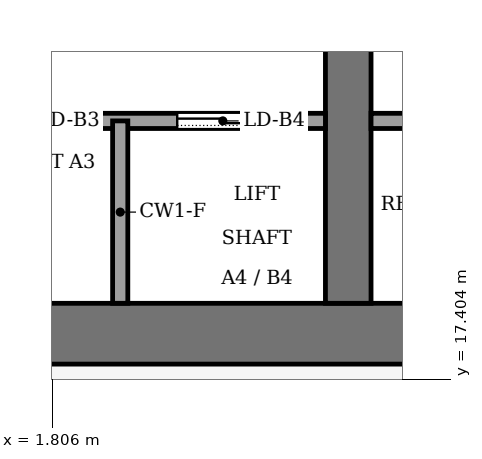
"""IFC4 building model, lengths in metres.
Left out: names, types, materials, properties, quantities, classifications, styles, units other than length and angle.
Written with IfcOpenShell. Run it as: python <this file> out.ifc"""

import sys

from ifc_helpers import new_model, si_unit, direction, frame, frame_2d, origin, place, context, subcontext, project, spatial, rectangle, extrude, element, fill, save


model = new_model("IFC4")
c1 = context("Model", 3, precision=1e-05, world=origin(), true_north=direction((0.0, 1.0)))
c2 = subcontext(c1, "Body", "Model", "MODEL_VIEW")
j1 = project(units=[si_unit("LENGTHUNIT", "METRE"), si_unit("PLANEANGLEUNIT", "RADIAN")], contexts=[c1])
p1 = place(None, origin())
s1 = spatial("IfcSite", under=j1, at=p1, CompositionType="ELEMENT")
p2 = place(p1, origin())
s2 = spatial("IfcBuilding", under=s1, at=p2, CompositionType="ELEMENT")
p3 = place(p2, frame((0.0, 0.0, 242.0)))
s3 = spatial("IfcBuildingStorey", under=s2, at=p3, CompositionType="ELEMENT", Elevation=242.0)
p4 = place(p3, frame((-13.4, 18.0, -0.13), z_axis=(0.0, 0.0, 1.0), x_axis=(1.0, 0.0, 0.0)))
e1 = element("IfcWall", 1, at=p4, inside=s3, PredefinedType="SHEAR", context=c2, shape_type="SweptSolid", body=[
    extrude(rectangle(XDim=26.8, YDim=0.8, at=frame_2d((13.4, 0.0))), origin(), (0.0, 0.0, 1.0), 4.0),
])
p5 = place(p3, frame((5.7, 18.4, -0.13), z_axis=(0.0, 0.0, 1.0), x_axis=(0.0, 1.0, 0.0)))
e2 = element("IfcWall", 2, at=p5, inside=s3, PredefinedType="SHEAR", context=c2, shape_type="SweptSolid", body=[
    extrude(rectangle(XDim=19.2, YDim=0.6, at=frame_2d((9.6, 0.0))), origin(), (0.0, 0.0, 1.0), 4.0),
])
p6 = place(p5, frame((8.35, 0.0, 0.13)))
e3 = element("IfcOpeningElement", 3, at=p6, cuts=e2, PredefinedType="OPENING", context=c2, shape_type="SweptSolid", body=[
    extrude(rectangle(XDim=0.9, YDim=2.1, at=frame_2d((0.45, 1.05))), frame((0.0, 0.31, 0.0), z_axis=(0.0, -1.0, 0.0), x_axis=(1.0, 0.0, 0.0)), (0.0, 0.0, 1.0), 0.62),
])
p7 = place(p5, frame((13.3, 0.0, 0.13)))
e4 = element("IfcOpeningElement", 4, at=p7, cuts=e2, PredefinedType="OPENING", context=c2, shape_type="SweptSolid", body=[
    extrude(rectangle(XDim=2.4, YDim=2.4, at=frame_2d((1.2, 1.2))), frame((0.0, 0.31, 0.0), z_axis=(0.0, -1.0, 0.0), x_axis=(1.0, 0.0, 0.0)), (0.0, 0.0, 1.0), 0.62),
])
p8 = place(p3, frame((-5.4, 20.8, 0.0), z_axis=(0.0, 0.0, 1.0), x_axis=(1.0, 0.0, 0.0)))
e5 = element("IfcWall", 5, at=p8, inside=s3, PredefinedType="PARTITIONING", context=c2, shape_type="SweptSolid", body=[
    extrude(rectangle(XDim=10.8, YDim=0.2, at=frame_2d((5.4, 0.0))), origin(), (0.0, 0.0, 1.0), 3.87),
])
p9 = place(p8, frame((0.75, 0.0, 0.0)))
e6 = element("IfcOpeningElement", 6, at=p9, cuts=e5, PredefinedType="OPENING", context=c2, shape_type="SweptSolid", body=[
    extrude(rectangle(XDim=1.2, YDim=2.2, at=frame_2d((0.6, 1.1))), frame((0.0, 0.11, 0.0), z_axis=(0.0, -1.0, 0.0), x_axis=(1.0, 0.0, 0.0)), (0.0, 0.0, 1.0), 0.22),
])
p10 = place(p8, frame((3.45, 0.0, 0.0)))
e7 = element("IfcOpeningElement", 7, at=p10, cuts=e5, PredefinedType="OPENING", context=c2, shape_type="SweptSolid", body=[
    extrude(rectangle(XDim=1.2, YDim=2.2, at=frame_2d((0.6, 1.1))), frame((0.0, 0.11, 0.0), z_axis=(0.0, -1.0, 0.0), x_axis=(1.0, 0.0, 0.0)), (0.0, 0.0, 1.0), 0.22),
])
p11 = place(p8, frame((6.15, 0.0, 0.0)))
e8 = element("IfcOpeningElement", 8, at=p11, cuts=e5, PredefinedType="OPENING", context=c2, shape_type="SweptSolid", body=[
    extrude(rectangle(XDim=1.2, YDim=2.2, at=frame_2d((0.6, 1.1))), frame((0.0, 0.11, 0.0), z_axis=(0.0, -1.0, 0.0), x_axis=(1.0, 0.0, 0.0)), (0.0, 0.0, 1.0), 0.22),
])
p12 = place(p8, frame((8.85, 0.0, 0.0)))
e9 = element("IfcOpeningElement", 9, at=p12, cuts=e5, PredefinedType="OPENING", context=c2, shape_type="SweptSolid", body=[
    extrude(rectangle(XDim=1.2, YDim=2.2, at=frame_2d((0.6, 1.1))), frame((0.0, 0.11, 0.0), z_axis=(0.0, -1.0, 0.0), x_axis=(1.0, 0.0, 0.0)), (0.0, 0.0, 1.0), 0.22),
])
p13 = place(p3, frame((6.0, 20.8, 0.0), z_axis=(0.0, 0.0, 1.0), x_axis=(1.0, 0.0, 0.0)))
e10 = element("IfcWall", 10, at=p13, inside=s3, PredefinedType="PARTITIONING", context=c2, shape_type="SweptSolid", body=[
    extrude(rectangle(XDim=6.6, YDim=0.2, at=frame_2d((3.3, 0.0))), origin(), (0.0, 0.0, 1.0), 3.87),
])
p14 = place(p13, frame((0.49, 0.0, 0.0)))
e11 = element("IfcOpeningElement", 11, at=p14, cuts=e10, PredefinedType="OPENING", context=c2, shape_type="SweptSolid", body=[
    extrude(rectangle(XDim=1.0, YDim=2.1, at=frame_2d((0.5, 1.05))), frame((0.0, 0.11, 0.0), z_axis=(0.0, -1.0, 0.0), x_axis=(1.0, 0.0, 0.0)), (0.0, 0.0, 1.0), 0.22),
])
p15 = place(p13, frame((3.79, 0.0, 0.0)))
e12 = element("IfcOpeningElement", 12, at=p15, cuts=e10, PredefinedType="OPENING", context=c2, shape_type="SweptSolid", body=[
    extrude(rectangle(XDim=1.0, YDim=2.1, at=frame_2d((0.5, 1.05))), frame((0.0, 0.11, 0.0), z_axis=(0.0, -1.0, 0.0), x_axis=(1.0, 0.0, 0.0)), (0.0, 0.0, 1.0), 0.22),
])
p16 = place(p3, frame((2.7, 18.4, 0.0), z_axis=(0.0, 0.0, 1.0), x_axis=(0.0, 1.0, 0.0)))
e13 = element("IfcWall", 13, at=p16, inside=s3, PredefinedType="PARTITIONING", context=c2, shape_type="SweptSolid", body=[
    extrude(rectangle(XDim=2.4, YDim=0.2, at=frame_2d((1.2, 0.0))), origin(), (0.0, 0.0, 1.0), 3.87),
])
p17 = place(p11, origin())
e14 = element("IfcDoor", 14, at=p17, inside=s3, OperationType="SLIDING_TO_LEFT", PredefinedType="DOOR", context=c2, shape_type="SweptSolid", body=[
    extrude(rectangle(XDim=1.2, YDim=2.2, at=frame_2d((0.6, 1.1))), frame((0.0, 0.025, 0.0), z_axis=(0.0, -1.0, 0.0), x_axis=(1.0, 0.0, 0.0)), (0.0, 0.0, 1.0), 0.05),
])
fill(e8, e14)
p18 = place(p12, origin())
e15 = element("IfcDoor", 15, at=p18, inside=s3, OperationType="SLIDING_TO_LEFT", PredefinedType="DOOR", context=c2, shape_type="SweptSolid", body=[
    extrude(rectangle(XDim=1.2, YDim=2.2, at=frame_2d((0.6, 1.1))), frame((0.0, 0.025, 0.0), z_axis=(0.0, -1.0, 0.0), x_axis=(1.0, 0.0, 0.0)), (0.0, 0.0, 1.0), 0.05),
])
fill(e9, e15)
save(model, sys.argv[1])
